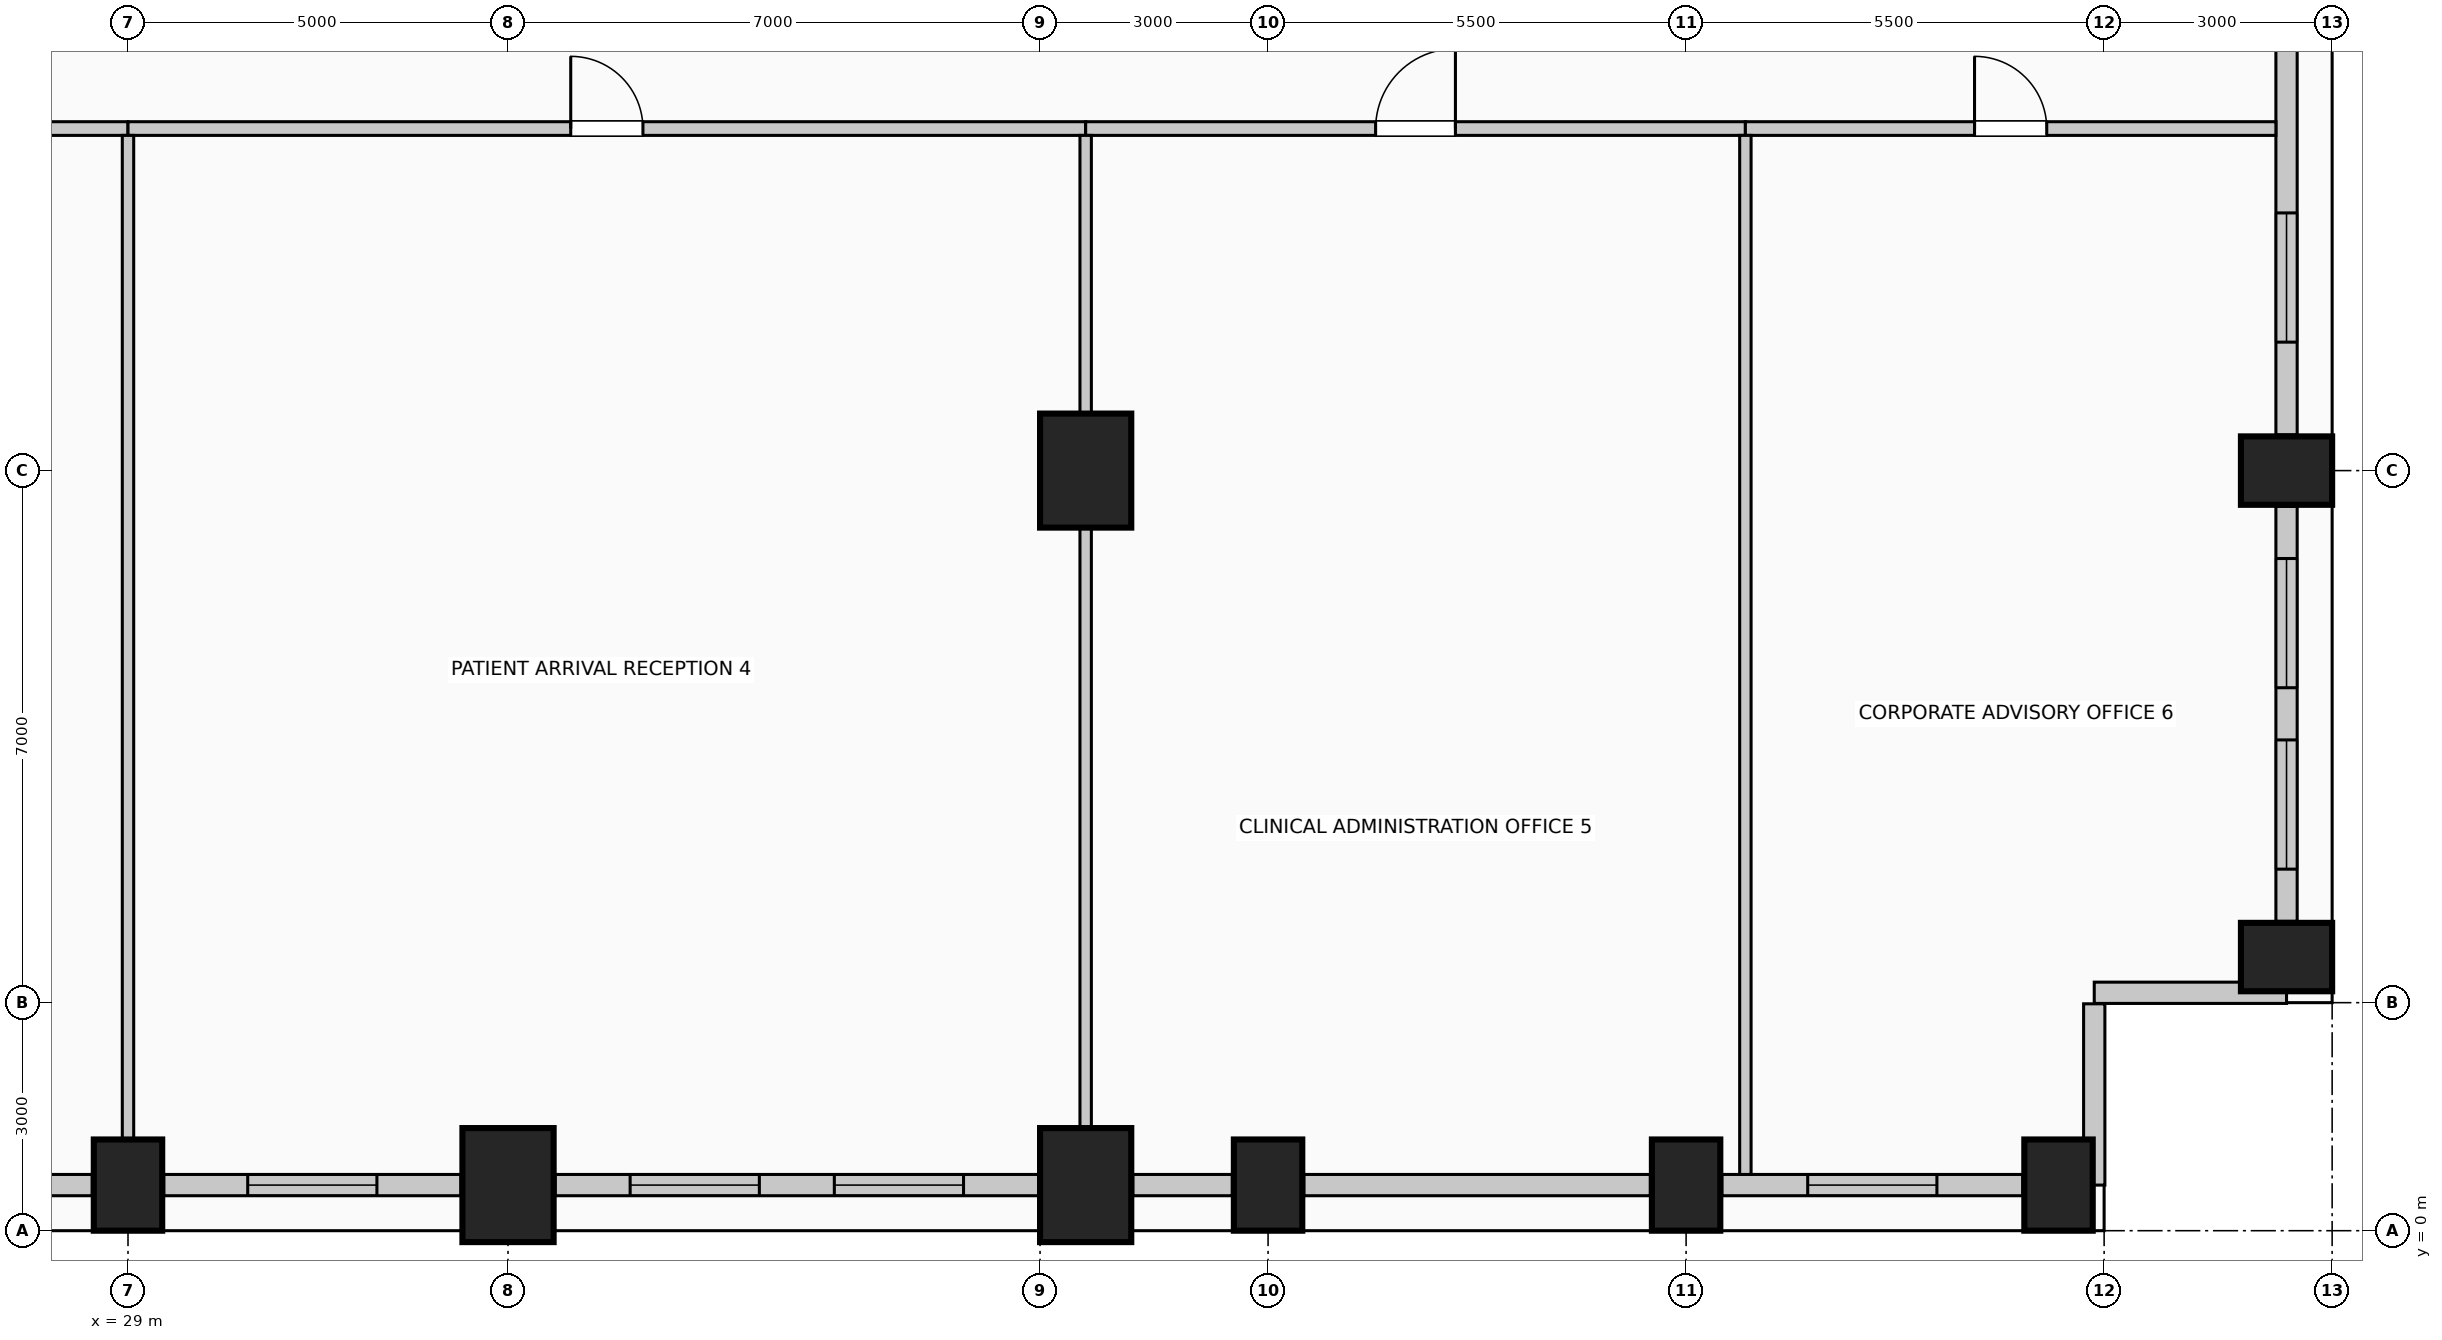
"""IFC4 building model, lengths in metres.
Left out: names, types, materials, properties, quantities, classifications, styles, units other than length and angle.
Written with IfcOpenShell. Run it as: python <this file> out.ifc"""

import sys

from ifc_helpers import new_model, si_unit, direction, frame, frame_2d, origin, origin_2d, place, context, subcontext, project, spatial, rectangle, extrude, element, fill, save


model = new_model("IFC4")
c1 = context("Model", 3, precision=1e-05, world=origin(), true_north=direction((0.0, 1.0)))
c2 = subcontext(c1, "Body", "Model", "MODEL_VIEW")
j1 = project(units=[si_unit("LENGTHUNIT", "METRE"), si_unit("PLANEANGLEUNIT", "RADIAN")], contexts=[c1])
p1 = place(None, origin())
s1 = spatial("IfcSite", under=j1, at=p1, CompositionType="ELEMENT")
p2 = place(p1, origin())
s2 = spatial("IfcBuilding", under=s1, at=p2, CompositionType="ELEMENT")
p3 = place(p2, frame((0.0, 0.0, 46.6)))
s3 = spatial("IfcBuildingStorey", under=s2, at=p3, CompositionType="ELEMENT", Elevation=46.6)
p4 = place(p3, frame((29.0, 0.6, 0.0), z_axis=(0.0, 0.0, 1.0), x_axis=(1.0, 0.0, 0.0)))
e1 = element("IfcColumn", 1, at=p4, inside=s3, PredefinedType="COLUMN", context=c2, shape_type="SweptSolid", body=[
    extrude(rectangle(XDim=0.9, YDim=1.2, at=origin_2d()), origin(), (0.0, 0.0, 1.0), 4.0),
])
for number, where, z_axis, x_axis in (
    (2, (34.0, 0.6, 0.0), (0.0, 0.0, 1.0), (1.0, 0.0, 0.0)),
    (3, (41.6, 0.6, 0.0), (0.0, 0.0, 1.0), (1.0, 0.0, 0.0)),
):
    element("IfcColumn", number, at=place(p3, frame(where, z_axis=z_axis, x_axis=x_axis)), inside=s3, PredefinedType="COLUMN", context=c2, shape_type="SweptSolid", body=[
        extrude(rectangle(XDim=1.2, YDim=1.5, at=origin_2d()), origin(), (0.0, 0.0, 1.0), 4.0),
    ])
for number, where, z_axis, x_axis in (
    (4, (44.0, 0.6, 0.0), (0.0, 0.0, 1.0), (1.0, 0.0, 0.0)),
    (5, (49.5, 0.6, 0.0), (0.0, 0.0, 1.0), (1.0, 0.0, 0.0)),
    (6, (54.4, 0.6, 0.0), (0.0, 0.0, 1.0), (1.0, 0.0, 0.0)),
    (7, (57.4, 3.6, 0.0), (0.0, 0.0, 1.0), (0.0, 1.0, 0.0)),
    (8, (57.4, 10.0, 0.0), (0.0, 0.0, 1.0), (0.0, 1.0, 0.0)),
):
    element("IfcColumn", number, at=place(p3, frame(where, z_axis=z_axis, x_axis=x_axis)), inside=s3, PredefinedType="COLUMN", context=c2, shape_type="SweptSolid", body=[
        extrude(rectangle(XDim=0.9, YDim=1.2, at=origin_2d()), origin(), (0.0, 0.0, 1.0), 4.0),
    ])
p5 = place(p3, frame((41.6, 10.0, 0.0), z_axis=(0.0, 0.0, 1.0), x_axis=(1.0, 0.0, 0.0)))
e9 = element("IfcColumn", 9, at=p5, inside=s3, PredefinedType="COLUMN", context=c2, shape_type="SweptSolid", body=[
    extrude(rectangle(XDim=1.2, YDim=1.5, at=origin_2d()), origin(), (0.0, 0.0, 1.0), 4.0),
])
p6 = place(p3, frame((28.53, 0.6, 0.0), z_axis=(0.0, 0.0, 1.0), x_axis=(-1.0, 0.0, 0.0)))
e10 = element("IfcWall", 10, at=p6, inside=s3, PredefinedType="SOLIDWALL", context=c2, shape_type="SweptSolid", body=[
    extrude(rectangle(XDim=3.91, YDim=0.28, at=frame_2d((1.955, 0.0))), origin(), (0.0, 0.0, 1.0), 2.85),
])
p7 = place(p6, frame((1.105, 0.0, 0.5)))
e11 = element("IfcOpeningElement", 11, at=p7, cuts=e10, PredefinedType="OPENING", context=c2, shape_type="SweptSolid", body=[
    extrude(rectangle(XDim=1.7, YDim=1.95, at=frame_2d((0.85, 0.975))), frame((0.0, 0.15, 0.0), z_axis=(0.0, -1.0, 0.0), x_axis=(1.0, 0.0, 0.0)), (0.0, 0.0, 1.0), 0.3),
])
p8 = place(p3, frame((33.38, 0.6, 0.0), z_axis=(0.0, 0.0, 1.0), x_axis=(-1.0, 0.0, 0.0)))
e12 = element("IfcWall", 12, at=p8, inside=s3, PredefinedType="SOLIDWALL", context=c2, shape_type="SweptSolid", body=[
    extrude(rectangle(XDim=3.91, YDim=0.28, at=frame_2d((1.955, 0.0))), origin(), (0.0, 0.0, 1.0), 2.85),
])
p9 = place(p8, frame((1.105, 0.0, 0.5)))
e13 = element("IfcOpeningElement", 13, at=p9, cuts=e12, PredefinedType="OPENING", context=c2, shape_type="SweptSolid", body=[
    extrude(rectangle(XDim=1.7, YDim=1.95, at=frame_2d((0.85, 0.975))), frame((0.0, 0.15, 0.0), z_axis=(0.0, -1.0, 0.0), x_axis=(1.0, 0.0, 0.0)), (0.0, 0.0, 1.0), 0.3),
])
p10 = place(p3, frame((40.98, 0.6, 0.0), z_axis=(0.0, 0.0, 1.0), x_axis=(-1.0, 0.0, 0.0)))
e14 = element("IfcWall", 14, at=p10, inside=s3, PredefinedType="SOLIDWALL", context=c2, shape_type="SweptSolid", body=[
    extrude(rectangle(XDim=6.36, YDim=0.28, at=frame_2d((3.18, 0.0))), origin(), (0.0, 0.0, 1.0), 2.85),
])
p11 = place(p10, frame((0.987, 0.0, 0.5)))
e15 = element("IfcOpeningElement", 15, at=p11, cuts=e14, PredefinedType="OPENING", context=c2, shape_type="SweptSolid", body=[
    extrude(rectangle(XDim=1.7, YDim=1.95, at=frame_2d((0.85, 0.975))), frame((0.0, 0.15, 0.0), z_axis=(0.0, -1.0, 0.0), x_axis=(1.0, 0.0, 0.0)), (0.0, 0.0, 1.0), 0.3),
])
p12 = place(p10, frame((3.673, 0.0, 0.5)))
e16 = element("IfcOpeningElement", 16, at=p12, cuts=e14, PredefinedType="OPENING", context=c2, shape_type="SweptSolid", body=[
    extrude(rectangle(XDim=1.7, YDim=1.95, at=frame_2d((0.85, 0.975))), frame((0.0, 0.15, 0.0), z_axis=(0.0, -1.0, 0.0), x_axis=(1.0, 0.0, 0.0)), (0.0, 0.0, 1.0), 0.3),
])
p13 = place(p3, frame((43.53, 0.6, 0.0), z_axis=(0.0, 0.0, 1.0), x_axis=(-1.0, 0.0, 0.0)))
e17 = element("IfcWall", 17, at=p13, inside=s3, PredefinedType="SOLIDWALL", context=c2, shape_type="SweptSolid", body=[
    extrude(rectangle(XDim=1.31, YDim=0.28, at=frame_2d((0.655, 0.0))), origin(), (0.0, 0.0, 1.0), 2.85),
])
p14 = place(p3, frame((49.03, 0.6, 0.0), z_axis=(0.0, 0.0, 1.0), x_axis=(-1.0, 0.0, 0.0)))
e18 = element("IfcWall", 18, at=p14, inside=s3, PredefinedType="SOLIDWALL", context=c2, shape_type="SweptSolid", body=[
    extrude(rectangle(XDim=4.56, YDim=0.28, at=frame_2d((2.28, 0.0))), origin(), (0.0, 0.0, 1.0), 2.85),
])
p15 = place(p3, frame((53.93, 0.6, 0.0), z_axis=(0.0, 0.0, 1.0), x_axis=(-1.0, 0.0, 0.0)))
e19 = element("IfcWall", 19, at=p15, inside=s3, PredefinedType="SOLIDWALL", context=c2, shape_type="SweptSolid", body=[
    extrude(rectangle(XDim=3.96, YDim=0.28, at=frame_2d((1.98, 0.0))), origin(), (0.0, 0.0, 1.0), 2.85),
])
p16 = place(p15, frame((1.13, 0.0, 0.5)))
e20 = element("IfcOpeningElement", 20, at=p16, cuts=e19, PredefinedType="OPENING", context=c2, shape_type="SweptSolid", body=[
    extrude(rectangle(XDim=1.7, YDim=1.95, at=frame_2d((0.85, 0.975))), frame((0.0, 0.15, 0.0), z_axis=(0.0, -1.0, 0.0), x_axis=(1.0, 0.0, 0.0)), (0.0, 0.0, 1.0), 0.3),
])
p17 = place(p3, frame((57.4, 9.53, 0.0), z_axis=(0.0, 0.0, 1.0), x_axis=(0.0, -1.0, 0.0)))
e21 = element("IfcWall", 21, at=p17, inside=s3, PredefinedType="SOLIDWALL", context=c2, shape_type="SweptSolid", body=[
    extrude(rectangle(XDim=5.46, YDim=0.28, at=frame_2d((2.73, 0.0))), origin(), (0.0, 0.0, 1.0), 2.85),
])
p18 = place(p17, frame((0.687, 0.0, 0.5)))
e22 = element("IfcOpeningElement", 22, at=p18, cuts=e21, PredefinedType="OPENING", context=c2, shape_type="SweptSolid", body=[
    extrude(rectangle(XDim=1.7, YDim=1.95, at=frame_2d((0.85, 0.975))), frame((0.0, 0.15, 0.0), z_axis=(0.0, -1.0, 0.0), x_axis=(1.0, 0.0, 0.0)), (0.0, 0.0, 1.0), 0.3),
])
p19 = place(p17, frame((3.073, 0.0, 0.5)))
e23 = element("IfcOpeningElement", 23, at=p19, cuts=e21, PredefinedType="OPENING", context=c2, shape_type="SweptSolid", body=[
    extrude(rectangle(XDim=1.7, YDim=1.95, at=frame_2d((0.85, 0.975))), frame((0.0, 0.15, 0.0), z_axis=(0.0, -1.0, 0.0), x_axis=(1.0, 0.0, 0.0)), (0.0, 0.0, 1.0), 0.3),
])
p20 = place(p3, frame((57.4, 17.53, 0.0), z_axis=(0.0, 0.0, 1.0), x_axis=(0.0, -1.0, 0.0)))
e24 = element("IfcWall", 24, at=p20, inside=s3, PredefinedType="SOLIDWALL", context=c2, shape_type="SweptSolid", body=[
    extrude(rectangle(XDim=7.06, YDim=0.28, at=frame_2d((3.53, 0.0))), origin(), (0.0, 0.0, 1.0), 2.85),
])
p21 = place(p20, frame((4.14, 0.0, 0.5)))
e25 = element("IfcOpeningElement", 25, at=p21, cuts=e24, PredefinedType="OPENING", context=c2, shape_type="SweptSolid", body=[
    extrude(rectangle(XDim=1.7, YDim=1.95, at=frame_2d((0.85, 0.975))), frame((0.0, 0.15, 0.0), z_axis=(0.0, -1.0, 0.0), x_axis=(1.0, 0.0, 0.0)), (0.0, 0.0, 1.0), 0.3),
])
p22 = place(p3, frame((57.4, 3.13, 0.0), z_axis=(0.0, 0.0, 1.0), x_axis=(-1.0, 0.0, 0.0)))
e26 = element("IfcWall", 26, at=p22, inside=s3, PredefinedType="SOLIDWALL", context=c2, shape_type="SweptSolid", body=[
    extrude(rectangle(XDim=2.53, YDim=0.28, at=frame_2d((1.265, 0.0))), origin(), (0.0, 0.0, 1.0), 3.7),
])
p23 = place(p3, frame((54.87, 2.985, 0.0), z_axis=(0.0, 0.0, 1.0), x_axis=(0.0, -1.0, 0.0)))
e27 = element("IfcWall", 27, at=p23, inside=s3, PredefinedType="SOLIDWALL", context=c2, shape_type="SweptSolid", body=[
    extrude(rectangle(XDim=2.385, YDim=0.28, at=frame_2d((1.192, 0.0))), origin(), (0.0, 0.0, 1.0), 3.7),
])
p24 = place(p3, frame((17.48, 14.5, 0.0), z_axis=(0.0, 0.0, 1.0), x_axis=(1.0, 0.0, 0.0)))
e28 = element("IfcWall", 28, at=p24, inside=s3, PredefinedType="PARTITIONING", context=c2, shape_type="SweptSolid", body=[
    extrude(rectangle(XDim=11.52, YDim=0.18, at=frame_2d((5.76, 0.0))), origin(), (0.0, 0.0, 1.0), 3.7),
])
p25 = place(p24, frame((5.235, 0.0, 0.0)))
e29 = element("IfcOpeningElement", 29, at=p25, cuts=e28, PredefinedType="OPENING", context=c2, shape_type="SweptSolid", body=[
    extrude(rectangle(XDim=1.05, YDim=2.15, at=frame_2d((0.525, 1.075))), frame((0.0, 0.1, 0.0), z_axis=(0.0, -1.0, 0.0), x_axis=(1.0, 0.0, 0.0)), (0.0, 0.0, 1.0), 0.2),
])
p26 = place(p3, frame((29.0, 14.5, 0.0), z_axis=(0.0, 0.0, 1.0), x_axis=(1.0, 0.0, 0.0)))
e30 = element("IfcWall", 30, at=p26, inside=s3, PredefinedType="PARTITIONING", context=c2, shape_type="SweptSolid", body=[
    extrude(rectangle(XDim=12.6, YDim=0.18, at=frame_2d((6.3, 0.0))), origin(), (0.0, 0.0, 1.0), 3.7),
])
p27 = place(p26, frame((5.825, 0.0, 0.0)))
e31 = element("IfcOpeningElement", 31, at=p27, cuts=e30, PredefinedType="OPENING", context=c2, shape_type="SweptSolid", body=[
    extrude(rectangle(XDim=0.95, YDim=2.15, at=frame_2d((0.475, 1.075))), frame((0.0, 0.1, 0.0), z_axis=(0.0, -1.0, 0.0), x_axis=(1.0, 0.0, 0.0)), (0.0, 0.0, 1.0), 0.2),
])
p28 = place(p3, frame((41.6, 14.5, 0.0), z_axis=(0.0, 0.0, 1.0), x_axis=(1.0, 0.0, 0.0)))
e32 = element("IfcWall", 32, at=p28, inside=s3, PredefinedType="PARTITIONING", context=c2, shape_type="SweptSolid", body=[
    extrude(rectangle(XDim=8.68, YDim=0.18, at=frame_2d((4.34, 0.0))), origin(), (0.0, 0.0, 1.0), 3.7),
])
p29 = place(p28, frame((3.815, 0.0, 0.0)))
e33 = element("IfcOpeningElement", 33, at=p29, cuts=e32, PredefinedType="OPENING", context=c2, shape_type="SweptSolid", body=[
    extrude(rectangle(XDim=1.05, YDim=2.15, at=frame_2d((0.525, 1.075))), frame((0.0, 0.1, 0.0), z_axis=(0.0, -1.0, 0.0), x_axis=(1.0, 0.0, 0.0)), (0.0, 0.0, 1.0), 0.2),
])
p30 = place(p3, frame((50.28, 14.5, 0.0), z_axis=(0.0, 0.0, 1.0), x_axis=(1.0, 0.0, 0.0)))
e34 = element("IfcWall", 34, at=p30, inside=s3, PredefinedType="PARTITIONING", context=c2, shape_type="SweptSolid", body=[
    extrude(rectangle(XDim=6.98, YDim=0.18, at=frame_2d((3.49, 0.0))), origin(), (0.0, 0.0, 1.0), 3.7),
])
p31 = place(p30, frame((3.015, 0.0, 0.0)))
e35 = element("IfcOpeningElement", 35, at=p31, cuts=e34, PredefinedType="OPENING", context=c2, shape_type="SweptSolid", body=[
    extrude(rectangle(XDim=0.95, YDim=2.15, at=frame_2d((0.475, 1.075))), frame((0.0, 0.1, 0.0), z_axis=(0.0, -1.0, 0.0), x_axis=(1.0, 0.0, 0.0)), (0.0, 0.0, 1.0), 0.2),
])
p32 = place(p3, frame((29.0, 1.2, 0.0), z_axis=(0.0, 0.0, 1.0), x_axis=(0.0, 1.0, 0.0)))
e36 = element("IfcWall", 36, at=p32, inside=s3, PredefinedType="PARTITIONING", context=c2, shape_type="SweptSolid", body=[
    extrude(rectangle(XDim=13.21, YDim=0.15, at=frame_2d((6.605, 0.0))), origin(), (0.0, 0.0, 1.0), 2.995),
])
p33 = place(p3, frame((41.6, 1.35, 0.0), z_axis=(0.0, 0.0, 1.0), x_axis=(0.0, 1.0, 0.0)))
e37 = element("IfcWall", 37, at=p33, inside=s3, PredefinedType="PARTITIONING", context=c2, shape_type="SweptSolid", body=[
    extrude(rectangle(XDim=7.9, YDim=0.15, at=frame_2d((3.95, 0.0))), origin(), (0.0, 0.0, 1.0), 2.995),
])
p34 = place(p3, frame((41.6, 10.75, 0.0), z_axis=(0.0, 0.0, 1.0), x_axis=(0.0, 1.0, 0.0)))
e38 = element("IfcWall", 38, at=p34, inside=s3, PredefinedType="PARTITIONING", context=c2, shape_type="SweptSolid", body=[
    extrude(rectangle(XDim=3.66, YDim=0.15, at=frame_2d((1.83, 0.0))), origin(), (0.0, 0.0, 1.0), 2.995),
])
p35 = place(p3, frame((50.28, 0.74, 0.0), z_axis=(0.0, 0.0, 1.0), x_axis=(0.0, 1.0, 0.0)))
e39 = element("IfcWall", 39, at=p35, inside=s3, PredefinedType="PARTITIONING", context=c2, shape_type="SweptSolid", body=[
    extrude(rectangle(XDim=13.67, YDim=0.15, at=frame_2d((6.835, 0.0))), origin(), (0.0, 0.0, 1.0), 3.7),
])
p36 = place(p9, origin())
e40 = element("IfcWindow", 40, at=p36, inside=s3, PartitioningType="SINGLE_PANEL", PredefinedType="WINDOW", context=c2, shape_type="SweptSolid", body=[
    extrude(rectangle(XDim=1.7, YDim=1.95, at=frame_2d((0.85, 0.975))), frame((0.0, 0.03, 0.0), z_axis=(0.0, -1.0, 0.0), x_axis=(1.0, 0.0, 0.0)), (0.0, 0.0, 1.0), 0.06),
])
fill(e13, e40)
p37 = place(p11, origin())
e41 = element("IfcWindow", 41, at=p37, inside=s3, PartitioningType="SINGLE_PANEL", PredefinedType="WINDOW", context=c2, shape_type="SweptSolid", body=[
    extrude(rectangle(XDim=1.7, YDim=1.95, at=frame_2d((0.85, 0.975))), frame((0.0, 0.03, 0.0), z_axis=(0.0, -1.0, 0.0), x_axis=(1.0, 0.0, 0.0)), (0.0, 0.0, 1.0), 0.06),
])
fill(e15, e41)
p38 = place(p12, origin())
e42 = element("IfcWindow", 42, at=p38, inside=s3, PartitioningType="SINGLE_PANEL", PredefinedType="WINDOW", context=c2, shape_type="SweptSolid", body=[
    extrude(rectangle(XDim=1.7, YDim=1.95, at=frame_2d((0.85, 0.975))), frame((0.0, 0.03, 0.0), z_axis=(0.0, -1.0, 0.0), x_axis=(1.0, 0.0, 0.0)), (0.0, 0.0, 1.0), 0.06),
])
fill(e16, e42)
p39 = place(p16, origin())
e43 = element("IfcWindow", 43, at=p39, inside=s3, PartitioningType="SINGLE_PANEL", PredefinedType="WINDOW", context=c2, shape_type="SweptSolid", body=[
    extrude(rectangle(XDim=1.7, YDim=1.95, at=frame_2d((0.85, 0.975))), frame((0.0, 0.03, 0.0), z_axis=(0.0, -1.0, 0.0), x_axis=(1.0, 0.0, 0.0)), (0.0, 0.0, 1.0), 0.06),
])
fill(e20, e43)
p40 = place(p18, origin())
e44 = element("IfcWindow", 44, at=p40, inside=s3, PartitioningType="SINGLE_PANEL", PredefinedType="WINDOW", context=c2, shape_type="SweptSolid", body=[
    extrude(rectangle(XDim=1.7, YDim=1.95, at=frame_2d((0.85, 0.975))), frame((0.0, 0.03, 0.0), z_axis=(0.0, -1.0, 0.0), x_axis=(1.0, 0.0, 0.0)), (0.0, 0.0, 1.0), 0.06),
])
fill(e22, e44)
p41 = place(p19, origin())
e45 = element("IfcWindow", 45, at=p41, inside=s3, PartitioningType="SINGLE_PANEL", PredefinedType="WINDOW", context=c2, shape_type="SweptSolid", body=[
    extrude(rectangle(XDim=1.7, YDim=1.95, at=frame_2d((0.85, 0.975))), frame((0.0, 0.03, 0.0), z_axis=(0.0, -1.0, 0.0), x_axis=(1.0, 0.0, 0.0)), (0.0, 0.0, 1.0), 0.06),
])
fill(e23, e45)
p42 = place(p21, origin())
e46 = element("IfcWindow", 46, at=p42, inside=s3, PartitioningType="SINGLE_PANEL", PredefinedType="WINDOW", context=c2, shape_type="SweptSolid", body=[
    extrude(rectangle(XDim=1.7, YDim=1.95, at=frame_2d((0.85, 0.975))), frame((0.0, 0.03, 0.0), z_axis=(0.0, -1.0, 0.0), x_axis=(1.0, 0.0, 0.0)), (0.0, 0.0, 1.0), 0.06),
])
fill(e25, e46)
p43 = place(p27, origin())
e47 = element("IfcDoor", 47, at=p43, inside=s3, OperationType="SINGLE_SWING_LEFT", PredefinedType="DOOR", context=c2, shape_type="SweptSolid", body=[
    extrude(rectangle(XDim=0.95, YDim=2.15, at=frame_2d((0.475, 1.075))), frame((0.0, 0.025, 0.0), z_axis=(0.0, -1.0, 0.0), x_axis=(1.0, 0.0, 0.0)), (0.0, 0.0, 1.0), 0.05),
])
fill(e31, e47)
p44 = place(p29, origin())
e48 = element("IfcDoor", 48, at=p44, inside=s3, OperationType="SINGLE_SWING_RIGHT", PredefinedType="DOOR", context=c2, shape_type="SweptSolid", body=[
    extrude(rectangle(XDim=1.05, YDim=2.15, at=frame_2d((0.525, 1.075))), frame((0.0, 0.025, 0.0), z_axis=(0.0, -1.0, 0.0), x_axis=(1.0, 0.0, 0.0)), (0.0, 0.0, 1.0), 0.05),
])
fill(e33, e48)
p45 = place(p31, origin())
e49 = element("IfcDoor", 49, at=p45, inside=s3, OperationType="SINGLE_SWING_LEFT", PredefinedType="DOOR", context=c2, shape_type="SweptSolid", body=[
    extrude(rectangle(XDim=0.95, YDim=2.15, at=frame_2d((0.475, 1.075))), frame((0.0, 0.025, 0.0), z_axis=(0.0, -1.0, 0.0), x_axis=(1.0, 0.0, 0.0)), (0.0, 0.0, 1.0), 0.05),
])
fill(e35, e49)
save(model, sys.argv[1])
